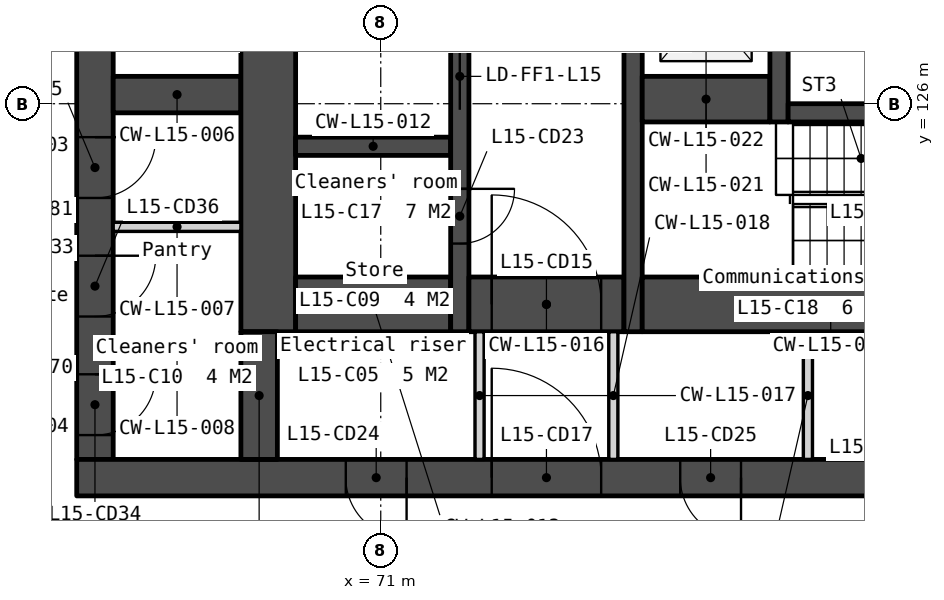
"""IFC4 building model, lengths in metres.
Left out: names, types, materials, properties, quantities, classifications, styles, units other than length and angle.
Written with IfcOpenShell. Run it as: python <this file> out.ifc"""

import sys

from ifc_helpers import new_model, si_unit, direction, frame, frame_2d, origin, place, context, subcontext, project, spatial, polyline, rectangle, outline, extrude, element, fill, save


model = new_model("IFC4")
c1 = context("Model", 3, precision=1e-05, world=origin(), true_north=direction((0.0, 1.0)))
c2 = subcontext(c1, "Body", "Model", "MODEL_VIEW")
j1 = project(units=[si_unit("LENGTHUNIT", "METRE"), si_unit("PLANEANGLEUNIT", "RADIAN")], contexts=[c1])
p1 = place(None, origin())
s1 = spatial("IfcSite", under=j1, at=p1, CompositionType="ELEMENT")
p2 = place(p1, origin())
s2 = spatial("IfcBuilding", under=s1, at=p2, CompositionType="ELEMENT")
p3 = place(p2, frame((0.0, 0.0, 66.5)))
s3 = spatial("IfcBuildingStorey", under=s2, at=p3, CompositionType="ELEMENT", Elevation=66.5)
p4 = place(p3, frame((66.3, 133.95, 0.0), z_axis=(0.0, 0.0, 1.0), x_axis=(0.0, -1.0, 0.0)))
e1 = element("IfcWall", 1, at=p4, inside=s3, PredefinedType="SOLIDWALL", context=c2, shape_type="SweptSolid", body=[
    extrude(rectangle(XDim=13.8, YDim=0.6, at=frame_2d((6.9, 0.0))), origin(), (0.0, 0.0, 1.0), 3.35),
])
p5 = place(p4, frame((0.6, 0.0, 0.0)))
e2 = element("IfcOpeningElement", 2, at=p5, cuts=e1, PredefinedType="OPENING", context=c2, shape_type="SweptSolid", body=[
    extrude(rectangle(XDim=1.1, YDim=2.1, at=frame_2d((0.55, 1.05))), frame((0.0, 0.31, 0.0), z_axis=(0.0, -1.0, 0.0), x_axis=(1.0, 0.0, 0.0)), (0.0, 0.0, 1.0), 0.62),
])
p6 = place(p4, frame((12.4, 0.0, 0.0)))
e3 = element("IfcOpeningElement", 3, at=p6, cuts=e1, PredefinedType="OPENING", context=c2, shape_type="SweptSolid", body=[
    extrude(rectangle(XDim=1.0, YDim=2.1, at=frame_2d((0.5, 1.05))), frame((0.0, 0.31, 0.0), z_axis=(0.0, -1.0, 0.0), x_axis=(1.0, 0.0, 0.0)), (0.0, 0.0, 1.0), 0.62),
])
p7 = place(p4, frame((8.5, 0.0, 0.0)))
e4 = element("IfcOpeningElement", 4, at=p7, cuts=e1, PredefinedType="OPENING", context=c2, shape_type="SweptSolid", body=[
    extrude(rectangle(XDim=1.0, YDim=2.1, at=frame_2d((0.5, 1.05))), frame((0.0, 0.31, 0.0), z_axis=(0.0, -1.0, 0.0), x_axis=(1.0, 0.0, 0.0)), (0.0, 0.0, 1.0), 0.62),
])
p8 = place(p4, frame((10.45, 0.0, 0.0)))
e5 = element("IfcOpeningElement", 5, at=p8, cuts=e1, PredefinedType="OPENING", context=c2, shape_type="SweptSolid", body=[
    extrude(rectangle(XDim=1.0, YDim=2.1, at=frame_2d((0.5, 1.05))), frame((0.0, 0.31, 0.0), z_axis=(0.0, -1.0, 0.0), x_axis=(1.0, 0.0, 0.0)), (0.0, 0.0, 1.0), 0.62),
])
p9 = place(p3, frame((66.0, 119.85, 0.0), z_axis=(0.0, 0.0, 1.0), x_axis=(1.0, 0.0, 0.0)))
e6 = element("IfcWall", 6, at=p9, inside=s3, PredefinedType="SOLIDWALL", context=c2, shape_type="SweptSolid", body=[
    extrude(rectangle(XDim=28.0, YDim=0.6, at=frame_2d((14.0, 0.0))), origin(), (0.0, 0.0, 1.0), 3.35),
])
p10 = place(p9, frame((6.825, 0.0, 0.0)))
e7 = element("IfcOpeningElement", 7, at=p10, cuts=e6, PredefinedType="OPENING", context=c2, shape_type="SweptSolid", body=[
    extrude(rectangle(XDim=1.8, YDim=2.1, at=frame_2d((0.9, 1.05))), frame((0.0, 0.31, 0.0), z_axis=(0.0, -1.0, 0.0), x_axis=(1.0, 0.0, 0.0)), (0.0, 0.0, 1.0), 0.62),
])
p11 = place(p9, frame((15.85, 0.0, 0.0)))
e8 = element("IfcOpeningElement", 8, at=p11, cuts=e6, PredefinedType="OPENING", context=c2, shape_type="SweptSolid", body=[
    extrude(rectangle(XDim=1.5, YDim=2.1, at=frame_2d((0.75, 1.05))), frame((0.0, 0.31, 0.0), z_axis=(0.0, -1.0, 0.0), x_axis=(1.0, 0.0, 0.0)), (0.0, 0.0, 1.0), 0.62),
])
p12 = place(p9, frame((19.375, 0.0, 0.0)))
e9 = element("IfcOpeningElement", 9, at=p12, cuts=e6, PredefinedType="OPENING", context=c2, shape_type="SweptSolid", body=[
    extrude(rectangle(XDim=1.8, YDim=2.1, at=frame_2d((0.9, 1.05))), frame((0.0, 0.31, 0.0), z_axis=(0.0, -1.0, 0.0), x_axis=(1.0, 0.0, 0.0)), (0.0, 0.0, 1.0), 0.62),
])
p13 = place(p9, frame((4.425, 0.0, 0.0)))
e10 = element("IfcOpeningElement", 10, at=p13, cuts=e6, PredefinedType="OPENING", context=c2, shape_type="SweptSolid", body=[
    extrude(rectangle(XDim=1.0, YDim=2.1, at=frame_2d((0.5, 1.05))), frame((0.0, 0.31, 0.0), z_axis=(0.0, -1.0, 0.0), x_axis=(1.0, 0.0, 0.0)), (0.0, 0.0, 1.0), 0.62),
])
p14 = place(p9, frame((9.925, 0.0, 0.0)))
e11 = element("IfcOpeningElement", 11, at=p14, cuts=e6, PredefinedType="OPENING", context=c2, shape_type="SweptSolid", body=[
    extrude(rectangle(XDim=1.0, YDim=2.1, at=frame_2d((0.5, 1.05))), frame((0.0, 0.31, 0.0), z_axis=(0.0, -1.0, 0.0), x_axis=(1.0, 0.0, 0.0)), (0.0, 0.0, 1.0), 0.62),
])
p15 = place(p9, frame((13.125, 0.0, 0.0)))
e12 = element("IfcOpeningElement", 12, at=p15, cuts=e6, PredefinedType="OPENING", context=c2, shape_type="SweptSolid", body=[
    extrude(rectangle(XDim=1.0, YDim=2.1, at=frame_2d((0.5, 1.05))), frame((0.0, 0.31, 0.0), z_axis=(0.0, -1.0, 0.0), x_axis=(1.0, 0.0, 0.0)), (0.0, 0.0, 1.0), 0.62),
])
p16 = place(p9, frame((21.725, 0.0, 0.0)))
e13 = element("IfcOpeningElement", 13, at=p16, cuts=e6, PredefinedType="OPENING", context=c2, shape_type="SweptSolid", body=[
    extrude(rectangle(XDim=1.0, YDim=2.1, at=frame_2d((0.5, 1.05))), frame((0.0, 0.31, 0.0), z_axis=(0.0, -1.0, 0.0), x_axis=(1.0, 0.0, 0.0)), (0.0, 0.0, 1.0), 0.62),
])
p17 = place(p9, frame((23.425, 0.0, 0.0)))
e14 = element("IfcOpeningElement", 14, at=p17, cuts=e6, PredefinedType="OPENING", context=c2, shape_type="SweptSolid", body=[
    extrude(rectangle(XDim=1.0, YDim=2.1, at=frame_2d((0.5, 1.05))), frame((0.0, 0.31, 0.0), z_axis=(0.0, -1.0, 0.0), x_axis=(1.0, 0.0, 0.0)), (0.0, 0.0, 1.0), 0.62),
])
p18 = place(p3, frame((66.6, 126.15, 0.0), z_axis=(0.0, 0.0, 1.0), x_axis=(1.0, 0.0, 0.0)))
e15 = element("IfcWall", 15, at=p18, inside=s3, PredefinedType="SOLIDWALL", context=c2, shape_type="SweptSolid", body=[
    extrude(rectangle(XDim=2.1, YDim=0.6, at=frame_2d((1.05, 0.0))), origin(), (0.0, 0.0, 1.0), 3.35),
])
for number, where, z_axis, x_axis in (
    (16, (66.6, 123.975, 0.0), (0.0, 0.0, 1.0), (1.0, 0.0, 0.0)),
    (17, (66.6, 122.025, 0.0), (0.0, 0.0, 1.0), (1.0, 0.0, 0.0)),
):
    element("IfcWall", number, at=place(p3, frame(where, z_axis=z_axis, x_axis=x_axis)), inside=s3, PredefinedType="PARTITIONING", context=c2, shape_type="SweptSolid", body=[
        extrude(rectangle(XDim=2.1, YDim=0.15, at=frame_2d((1.05, 0.0))), origin(), (0.0, 0.0, 1.0), 3.35),
    ])
p19 = place(p3, frame((69.15, 133.95, 0.0), z_axis=(0.0, 0.0, 1.0), x_axis=(0.0, -1.0, 0.0)))
e18 = element("IfcWall", 18, at=p19, inside=s3, PredefinedType="SOLIDWALL", context=c2, shape_type="SweptSolid", body=[
    extrude(rectangle(XDim=11.7, YDim=0.9, at=frame_2d((5.85, 0.0))), origin(), (0.0, 0.0, 1.0), 3.35),
])
p20 = place(p3, frame((69.0, 122.25, 0.0), z_axis=(0.0, 0.0, 1.0), x_axis=(0.0, -1.0, 0.0)))
e19 = element("IfcWall", 19, at=p20, inside=s3, PredefinedType="SOLIDWALL", context=c2, shape_type="SweptSolid", body=[
    extrude(rectangle(XDim=2.1, YDim=0.6, at=frame_2d((1.05, 0.0))), origin(), (0.0, 0.0, 1.0), 3.35),
])
p21 = place(p3, frame((69.6, 125.3, 0.0), z_axis=(0.0, 0.0, 1.0), x_axis=(1.0, 0.0, 0.0)))
e20 = element("IfcWall", 20, at=p21, inside=s3, PredefinedType="SOLIDWALL", context=c2, shape_type="SweptSolid", body=[
    extrude(rectangle(XDim=2.55, YDim=0.3, at=frame_2d((1.275, 0.0))), origin(), (0.0, 0.0, 1.0), 3.35),
])
p22 = place(p3, frame((69.6, 122.7, 0.0), z_axis=(0.0, 0.0, 1.0), x_axis=(1.0, 0.0, 0.0)))
e21 = element("IfcWall", 21, at=p22, inside=s3, PredefinedType="SOLIDWALL", context=c2, shape_type="SweptSolid", body=[
    extrude(rectangle(XDim=2.55, YDim=0.9, at=frame_2d((1.275, 0.0))), origin(), (0.0, 0.0, 1.0), 3.35),
])
p23 = place(p3, frame((72.3, 133.95, 0.0), z_axis=(0.0, 0.0, 1.0), x_axis=(0.0, -1.0, 0.0)))
e22 = element("IfcWall", 22, at=p23, inside=s3, PredefinedType="SOLIDWALL", context=c2, shape_type="SweptSolid", body=[
    extrude(rectangle(XDim=11.7, YDim=0.3, at=frame_2d((5.85, 0.0))), origin(), (0.0, 0.0, 1.0), 3.35),
])
p24 = place(p23, frame((6.95, 0.0, 0.0)))
e23 = element("IfcOpeningElement", 23, at=p24, cuts=e22, PredefinedType="OPENING", context=c2, shape_type="SweptSolid", body=[
    extrude(rectangle(XDim=1.1, YDim=2.1, at=frame_2d((0.55, 1.05))), frame((0.0, 0.16, 0.0), z_axis=(0.0, -1.0, 0.0), x_axis=(1.0, 0.0, 0.0)), (0.0, 0.0, 1.0), 0.32),
])
p25 = place(p23, frame((9.35, 0.0, 0.0)))
e24 = element("IfcOpeningElement", 24, at=p25, cuts=e22, PredefinedType="OPENING", context=c2, shape_type="SweptSolid", body=[
    extrude(rectangle(XDim=0.9, YDim=2.1, at=frame_2d((0.45, 1.05))), frame((0.0, 0.16, 0.0), z_axis=(0.0, -1.0, 0.0), x_axis=(1.0, 0.0, 0.0)), (0.0, 0.0, 1.0), 0.32),
])
p26 = place(p23, frame((5.1, 0.0, 0.0)))
e25 = element("IfcOpeningElement", 25, at=p26, cuts=e22, PredefinedType="OPENING", context=c2, shape_type="SweptSolid", body=[
    extrude(rectangle(XDim=1.0, YDim=2.1, at=frame_2d((0.5, 1.05))), frame((0.0, 0.16, 0.0), z_axis=(0.0, -1.0, 0.0), x_axis=(1.0, 0.0, 0.0)), (0.0, 0.0, 1.0), 0.32),
])
p27 = place(p3, frame((72.45, 122.7, 0.0), z_axis=(0.0, 0.0, 1.0), x_axis=(1.0, 0.0, 0.0)))
e26 = element("IfcWall", 26, at=p27, inside=s3, PredefinedType="SOLIDWALL", context=c2, shape_type="SweptSolid", body=[
    extrude(rectangle(XDim=2.55, YDim=0.9, at=frame_2d((1.275, 0.0))), origin(), (0.0, 0.0, 1.0), 3.35),
])
p28 = place(p27, frame((0.375, 0.0, 0.0)))
e27 = element("IfcOpeningElement", 27, at=p28, cuts=e26, PredefinedType="OPENING", context=c2, shape_type="SweptSolid", body=[
    extrude(rectangle(XDim=1.8, YDim=2.1, at=frame_2d((0.9, 1.05))), frame((0.0, 0.46, 0.0), z_axis=(0.0, -1.0, 0.0), x_axis=(1.0, 0.0, 0.0)), (0.0, 0.0, 1.0), 0.92),
])
for number, where, z_axis, x_axis in (
    (28, (72.625, 122.25, 0.0), (0.0, 0.0, 1.0), (0.0, -1.0, 0.0)),
    (29, (74.825, 122.25, 0.0), (0.0, 0.0, 1.0), (0.0, -1.0, 0.0)),
):
    element("IfcWall", number, at=place(p3, frame(where, z_axis=z_axis, x_axis=x_axis)), inside=s3, PredefinedType="PARTITIONING", context=c2, shape_type="SweptSolid", body=[
        extrude(rectangle(XDim=2.1, YDim=0.15, at=frame_2d((1.05, 0.0))), origin(), (0.0, 0.0, 1.0), 3.35),
    ])
p29 = place(p3, frame((75.15, 133.95, 0.0), z_axis=(0.0, 0.0, 1.0), x_axis=(0.0, -1.0, 0.0)))
e30 = element("IfcWall", 30, at=p29, inside=s3, PredefinedType="SOLIDWALL", context=c2, shape_type="SweptSolid", body=[
    extrude(rectangle(XDim=11.7, YDim=0.3, at=frame_2d((5.85, 0.0))), origin(), (0.0, 0.0, 1.0), 3.35),
])
p30 = place(p3, frame((75.3, 126.075, 0.0), z_axis=(0.0, 0.0, 1.0), x_axis=(1.0, 0.0, 0.0)))
e31 = element("IfcWall", 31, at=p30, inside=s3, PredefinedType="SOLIDWALL", context=c2, shape_type="SweptSolid", body=[
    extrude(rectangle(XDim=2.1, YDim=0.75, at=frame_2d((1.05, 0.0))), origin(), (0.0, 0.0, 1.0), 3.35),
])
p31 = place(p3, frame((75.3, 122.7, 0.0), z_axis=(0.0, 0.0, 1.0), x_axis=(1.0, 0.0, 0.0)))
e32 = element("IfcWall", 32, at=p31, inside=s3, PredefinedType="SOLIDWALL", context=c2, shape_type="SweptSolid", body=[
    extrude(rectangle(XDim=6.2, YDim=0.9, at=frame_2d((3.1, 0.0))), origin(), (0.0, 0.0, 1.0), 3.35),
])
p32 = place(p3, frame((77.55, 133.95, 0.0), z_axis=(0.0, 0.0, 1.0), x_axis=(0.0, -1.0, 0.0)))
e33 = element("IfcWall", 33, at=p32, inside=s3, PredefinedType="SOLIDWALL", context=c2, shape_type="SweptSolid", body=[
    extrude(rectangle(XDim=8.25, YDim=0.3, at=frame_2d((4.125, 0.0))), origin(), (0.0, 0.0, 1.0), 3.35),
])
p33 = place(p32, frame((0.6, 0.0, 0.0)))
e34 = element("IfcOpeningElement", 34, at=p33, cuts=e33, PredefinedType="OPENING", context=c2, shape_type="SweptSolid", body=[
    extrude(rectangle(XDim=1.1, YDim=2.1, at=frame_2d((0.55, 1.05))), frame((0.0, 0.16, 0.0), z_axis=(0.0, -1.0, 0.0), x_axis=(1.0, 0.0, 0.0)), (0.0, 0.0, 1.0), 0.32),
])
p34 = place(p32, frame((3.2, 0.0, 0.0)))
e35 = element("IfcOpeningElement", 35, at=p34, cuts=e33, PredefinedType="OPENING", context=c2, shape_type="SweptSolid", body=[
    extrude(rectangle(XDim=1.1, YDim=2.1, at=frame_2d((0.55, 1.05))), frame((0.0, 0.16, 0.0), z_axis=(0.0, -1.0, 0.0), x_axis=(1.0, 0.0, 0.0)), (0.0, 0.0, 1.0), 0.32),
])
p35 = place(p32, frame((5.8, 0.0, 0.0)))
e36 = element("IfcOpeningElement", 36, at=p35, cuts=e33, PredefinedType="OPENING", context=c2, shape_type="SweptSolid", body=[
    extrude(rectangle(XDim=1.1, YDim=2.1, at=frame_2d((0.55, 1.05))), frame((0.0, 0.16, 0.0), z_axis=(0.0, -1.0, 0.0), x_axis=(1.0, 0.0, 0.0)), (0.0, 0.0, 1.0), 0.32),
])
p36 = place(p3, frame((77.7, 125.85, 0.0), z_axis=(0.0, 0.0, 1.0), x_axis=(1.0, 0.0, 0.0)))
e37 = element("IfcWall", 37, at=p36, inside=s3, PredefinedType="SOLIDWALL", context=c2, shape_type="SweptSolid", body=[
    extrude(rectangle(XDim=4.6, YDim=0.3, at=frame_2d((2.3, 0.0))), origin(), (0.0, 0.0, 1.0), 3.35),
])
p37 = place(p3, frame((78.025, 122.25, 0.0), z_axis=(0.0, 0.0, 1.0), x_axis=(0.0, -1.0, 0.0)))
e38 = element("IfcWall", 38, at=p37, inside=s3, PredefinedType="PARTITIONING", context=c2, shape_type="SweptSolid", body=[
    extrude(rectangle(XDim=2.1, YDim=0.15, at=frame_2d((1.05, 0.0))), origin(), (0.0, 0.0, 1.0), 3.35),
])
p38 = place(p3, frame((54.495, 129.397, -0.15), z_axis=(0.0, 0.0, 1.0), x_axis=(0.499999201451, -0.866025864826, 0.0)))
e39 = element("IfcWall", 39, at=p38, inside=s3, PredefinedType="SOLIDWALL", context=c2, shape_type="SweptSolid", body=[
    extrude(outline(polyline([(44.8, 0.0), (44.8, 3.5), (0.0, 3.5), (0.0, 0.0), (44.8, 0.0)])), frame((0.0, 0.225, 0.0), z_axis=(0.0, -1.0, 0.0), x_axis=(1.0, 0.0, 0.0)), (0.0, 0.0, 1.0), 0.45),
])
p39 = place(p38, frame((0.722, 0.0, 1.05)))
e40 = element("IfcOpeningElement", 40, at=p39, cuts=e39, PredefinedType="OPENING", context=c2, shape_type="SweptSolid", body=[
    extrude(rectangle(XDim=1.2, YDim=1.5, at=frame_2d((0.6, 0.75))), frame((0.0, 0.235, 0.0), z_axis=(0.0, -1.0, 0.0), x_axis=(1.0, 0.0, 0.0)), (0.0, 0.0, 1.0), 0.47),
])
p40 = place(p38, frame((7.51, 0.0, 1.05)))
e41 = element("IfcOpeningElement", 41, at=p40, cuts=e39, PredefinedType="OPENING", context=c2, shape_type="SweptSolid", body=[
    extrude(rectangle(XDim=1.2, YDim=1.5, at=frame_2d((0.6, 0.75))), frame((0.0, 0.235, 0.0), z_axis=(0.0, -1.0, 0.0), x_axis=(1.0, 0.0, 0.0)), (0.0, 0.0, 1.0), 0.47),
])
p41 = place(p38, frame((9.21, 0.0, 1.05)))
e42 = element("IfcOpeningElement", 42, at=p41, cuts=e39, PredefinedType="OPENING", context=c2, shape_type="SweptSolid", body=[
    extrude(rectangle(XDim=1.2, YDim=1.5, at=frame_2d((0.6, 0.75))), frame((0.0, 0.235, 0.0), z_axis=(0.0, -1.0, 0.0), x_axis=(1.0, 0.0, 0.0)), (0.0, 0.0, 1.0), 0.47),
])
p42 = place(p38, frame((16.47, 0.0, 1.05)))
e43 = element("IfcOpeningElement", 43, at=p42, cuts=e39, PredefinedType="OPENING", context=c2, shape_type="SweptSolid", body=[
    extrude(rectangle(XDim=1.2, YDim=1.5, at=frame_2d((0.6, 0.75))), frame((0.0, 0.235, 0.0), z_axis=(0.0, -1.0, 0.0), x_axis=(1.0, 0.0, 0.0)), (0.0, 0.0, 1.0), 0.47),
])
p43 = place(p38, frame((18.17, 0.0, 1.05)))
e44 = element("IfcOpeningElement", 44, at=p43, cuts=e39, PredefinedType="OPENING", context=c2, shape_type="SweptSolid", body=[
    extrude(rectangle(XDim=1.2, YDim=1.5, at=frame_2d((0.6, 0.75))), frame((0.0, 0.235, 0.0), z_axis=(0.0, -1.0, 0.0), x_axis=(1.0, 0.0, 0.0)), (0.0, 0.0, 1.0), 0.47),
])
p44 = place(p38, frame((25.43, 0.0, 1.05)))
e45 = element("IfcOpeningElement", 45, at=p44, cuts=e39, PredefinedType="OPENING", context=c2, shape_type="SweptSolid", body=[
    extrude(rectangle(XDim=1.2, YDim=1.5, at=frame_2d((0.6, 0.75))), frame((0.0, 0.235, 0.0), z_axis=(0.0, -1.0, 0.0), x_axis=(1.0, 0.0, 0.0)), (0.0, 0.0, 1.0), 0.47),
])
p45 = place(p38, frame((27.13, 0.0, 1.05)))
e46 = element("IfcOpeningElement", 46, at=p45, cuts=e39, PredefinedType="OPENING", context=c2, shape_type="SweptSolid", body=[
    extrude(rectangle(XDim=1.2, YDim=1.5, at=frame_2d((0.6, 0.75))), frame((0.0, 0.235, 0.0), z_axis=(0.0, -1.0, 0.0), x_axis=(1.0, 0.0, 0.0)), (0.0, 0.0, 1.0), 0.47),
])
p46 = place(p38, frame((34.39, 0.0, 1.05)))
e47 = element("IfcOpeningElement", 47, at=p46, cuts=e39, PredefinedType="OPENING", context=c2, shape_type="SweptSolid", body=[
    extrude(rectangle(XDim=1.2, YDim=1.5, at=frame_2d((0.6, 0.75))), frame((0.0, 0.235, 0.0), z_axis=(0.0, -1.0, 0.0), x_axis=(1.0, 0.0, 0.0)), (0.0, 0.0, 1.0), 0.47),
])
p47 = place(p38, frame((36.09, 0.0, 1.05)))
e48 = element("IfcOpeningElement", 48, at=p47, cuts=e39, PredefinedType="OPENING", context=c2, shape_type="SweptSolid", body=[
    extrude(rectangle(XDim=1.2, YDim=1.5, at=frame_2d((0.6, 0.75))), frame((0.0, 0.235, 0.0), z_axis=(0.0, -1.0, 0.0), x_axis=(1.0, 0.0, 0.0)), (0.0, 0.0, 1.0), 0.47),
])
p48 = place(p38, frame((42.878, 0.0, 1.05)))
e49 = element("IfcOpeningElement", 49, at=p48, cuts=e39, PredefinedType="OPENING", context=c2, shape_type="SweptSolid", body=[
    extrude(rectangle(XDim=1.2, YDim=1.5, at=frame_2d((0.6, 0.75))), frame((0.0, 0.235, 0.0), z_axis=(0.0, -1.0, 0.0), x_axis=(1.0, 0.0, 0.0)), (0.0, 0.0, 1.0), 0.47),
])
p49 = place(p24, origin())
e50 = element("IfcDoor", 50, at=p49, inside=s3, OperationType="SLIDING_TO_LEFT", PredefinedType="DOOR", context=c2, shape_type="SweptSolid", body=[
    extrude(rectangle(XDim=1.1, YDim=2.1, at=frame_2d((0.55, 1.05))), frame((0.0, 0.025, 0.0), z_axis=(0.0, -1.0, 0.0), x_axis=(1.0, 0.0, 0.0)), (0.0, 0.0, 1.0), 0.05),
])
fill(e23, e50)
p50 = place(p28, origin())
e51 = element("IfcDoor", 51, at=p50, inside=s3, OperationType="DOUBLE_DOOR_DOUBLE_SWING", PredefinedType="DOOR", context=c2, shape_type="SweptSolid", body=[
    extrude(rectangle(XDim=1.8, YDim=2.1, at=frame_2d((0.9, 1.05))), frame((0.0, 0.025, 0.0), z_axis=(0.0, -1.0, 0.0), x_axis=(1.0, 0.0, 0.0)), (0.0, 0.0, 1.0), 0.05),
])
fill(e27, e51)
p51 = place(p10, origin())
e52 = element("IfcDoor", 52, at=p51, inside=s3, OperationType="DOUBLE_DOOR_DOUBLE_SWING", PredefinedType="DOOR", context=c2, shape_type="SweptSolid", body=[
    extrude(rectangle(XDim=1.8, YDim=2.1, at=frame_2d((0.9, 1.05))), frame((0.0, 0.025, 0.0), z_axis=(0.0, -1.0, 0.0), x_axis=(1.0, 0.0, 0.0)), (0.0, 0.0, 1.0), 0.05),
])
fill(e7, e52)
p52 = place(p25, origin())
e53 = element("IfcDoor", 53, at=p52, inside=s3, OperationType="SINGLE_SWING_LEFT", PredefinedType="DOOR", context=c2, shape_type="SweptSolid", body=[
    extrude(rectangle(XDim=0.9, YDim=2.1, at=frame_2d((0.45, 1.05))), frame((0.0, 0.025, 0.0), z_axis=(0.0, -1.0, 0.0), x_axis=(1.0, 0.0, 0.0)), (0.0, 0.0, 1.0), 0.05),
])
fill(e24, e53)
p53 = place(p13, origin())
e54 = element("IfcDoor", 54, at=p53, inside=s3, OperationType="SINGLE_SWING_RIGHT", PredefinedType="DOOR", context=c2, shape_type="SweptSolid", body=[
    extrude(rectangle(XDim=1.0, YDim=2.1, at=frame_2d((0.5, 1.05))), frame((0.0, 0.025, 0.0), z_axis=(0.0, -1.0, 0.0), x_axis=(1.0, 0.0, 0.0)), (0.0, 0.0, 1.0), 0.05),
])
fill(e10, e54)
p54 = place(p14, origin())
e55 = element("IfcDoor", 55, at=p54, inside=s3, OperationType="SINGLE_SWING_RIGHT", PredefinedType="DOOR", context=c2, shape_type="SweptSolid", body=[
    extrude(rectangle(XDim=1.0, YDim=2.1, at=frame_2d((0.5, 1.05))), frame((0.0, 0.025, 0.0), z_axis=(0.0, -1.0, 0.0), x_axis=(1.0, 0.0, 0.0)), (0.0, 0.0, 1.0), 0.05),
])
fill(e11, e55)
p55 = place(p6, origin())
e56 = element("IfcDoor", 56, at=p55, inside=s3, OperationType="SINGLE_SWING_LEFT", PredefinedType="DOOR", context=c2, shape_type="SweptSolid", body=[
    extrude(rectangle(XDim=1.0, YDim=2.1, at=frame_2d((0.5, 1.05))), frame((0.0, 0.025, 0.0), z_axis=(0.0, -1.0, 0.0), x_axis=(1.0, 0.0, 0.0)), (0.0, 0.0, 1.0), 0.05),
])
fill(e3, e56)
p56 = place(p7, origin())
e57 = element("IfcDoor", 57, at=p56, inside=s3, OperationType="SINGLE_SWING_LEFT", PredefinedType="DOOR", context=c2, shape_type="SweptSolid", body=[
    extrude(rectangle(XDim=1.0, YDim=2.1, at=frame_2d((0.5, 1.05))), frame((0.0, 0.025, 0.0), z_axis=(0.0, -1.0, 0.0), x_axis=(1.0, 0.0, 0.0)), (0.0, 0.0, 1.0), 0.05),
])
fill(e4, e57)
p57 = place(p8, origin())
e58 = element("IfcDoor", 58, at=p57, inside=s3, OperationType="SINGLE_SWING_LEFT", PredefinedType="DOOR", context=c2, shape_type="SweptSolid", body=[
    extrude(rectangle(XDim=1.0, YDim=2.1, at=frame_2d((0.5, 1.05))), frame((0.0, 0.025, 0.0), z_axis=(0.0, -1.0, 0.0), x_axis=(1.0, 0.0, 0.0)), (0.0, 0.0, 1.0), 0.05),
])
fill(e5, e58)
save(model, sys.argv[1])
